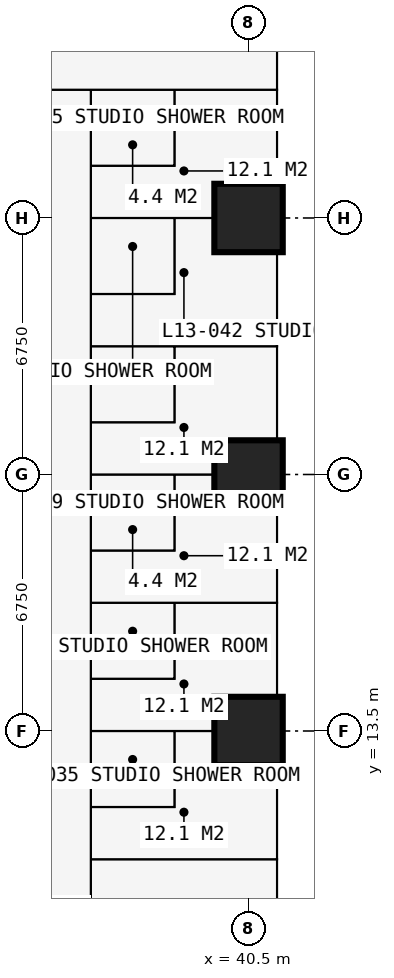
"""IFC4 building model, lengths in metres.
Left out: names, types, materials, properties, quantities, classifications, styles, units other than length and angle.
Written with IfcOpenShell. Run it as: python <this file> out.ifc"""

import sys

from ifc_helpers import new_model, si_unit, direction, frame, frame_2d, origin, origin_2d, place, context, subcontext, project, spatial, rectangle, extrude, element, fill, save


model = new_model("IFC4")
c1 = context("Model", 3, precision=1e-05, world=origin(), true_north=direction((0.0, 1.0)))
c2 = subcontext(c1, "Body", "Model", "MODEL_VIEW")
j1 = project(units=[si_unit("LENGTHUNIT", "METRE"), si_unit("PLANEANGLEUNIT", "RADIAN")], contexts=[c1])
p1 = place(None, origin())
s1 = spatial("IfcSite", under=j1, at=p1, CompositionType="ELEMENT")
p2 = place(p1, origin())
s2 = spatial("IfcBuilding", under=s1, at=p2, CompositionType="ELEMENT")
p3 = place(p2, frame((0.0, 0.0, 50.4)))
s3 = spatial("IfcBuildingStorey", under=s2, at=p3, CompositionType="ELEMENT", Elevation=50.4)
for number, where, z_axis, x_axis in (
    (1, (40.5, 13.5, 0.0), (0.0, 0.0, 1.0), (1.0, 0.0, 0.0)),
    (2, (40.5, 20.25, 0.0), (0.0, 0.0, 1.0), (1.0, 0.0, 0.0)),
    (3, (40.5, 27.0, 0.0), (0.0, 0.0, 1.0), (1.0, 0.0, 0.0)),
):
    element("IfcColumn", number, at=place(p3, frame(where, z_axis=z_axis, x_axis=x_axis)), inside=s3, PredefinedType="COLUMN", context=c2, shape_type="SweptSolid", body=[
        extrude(rectangle(XDim=1.8, YDim=1.8, at=origin_2d()), origin(), (0.0, 0.0, 1.0), 3.6),
    ])
p4 = place(p3, frame((41.25, 27.0, 0.0), z_axis=(0.0, 0.0, 1.0), x_axis=(0.0, -1.0, 0.0)))
e4 = element("IfcWall", 4, at=p4, inside=s3, PredefinedType="SOLIDWALL", context=c2, shape_type="SweptSolid", body=[
    extrude(rectangle(XDim=6.75, YDim=0.15, at=frame_2d((3.375, 0.0))), origin(), (0.0, 0.0, 1.0), 3.375),
])
p5 = place(p4, frame((0.962, 0.0, 0.0)))
e5 = element("IfcOpeningElement", 5, at=p5, cuts=e4, PredefinedType="OPENING", context=c2, shape_type="SweptSolid", body=[
    extrude(rectangle(XDim=1.0, YDim=2.2, at=frame_2d((0.5, 1.1))), frame((0.0, 0.085, 0.0), z_axis=(0.0, -1.0, 0.0), x_axis=(1.0, 0.0, 0.0)), (0.0, 0.0, 1.0), 0.17),
])
p6 = place(p4, frame((2.025, 0.0, 0.9)))
e6 = element("IfcOpeningElement", 6, at=p6, cuts=e4, PredefinedType="OPENING", context=c2, shape_type="SweptSolid", body=[
    extrude(rectangle(XDim=1.2, YDim=1.8, at=frame_2d((0.6, 0.9))), frame((0.0, 0.085, 0.0), z_axis=(0.0, -1.0, 0.0), x_axis=(1.0, 0.0, 0.0)), (0.0, 0.0, 1.0), 0.17),
])
p7 = place(p4, frame((4.788, 0.0, 0.0)))
e7 = element("IfcOpeningElement", 7, at=p7, cuts=e4, PredefinedType="OPENING", context=c2, shape_type="SweptSolid", body=[
    extrude(rectangle(XDim=1.0, YDim=2.2, at=frame_2d((0.5, 1.1))), frame((0.0, 0.085, 0.0), z_axis=(0.0, -1.0, 0.0), x_axis=(1.0, 0.0, 0.0)), (0.0, 0.0, 1.0), 0.17),
])
p8 = place(p4, frame((3.525, 0.0, 0.9)))
e8 = element("IfcOpeningElement", 8, at=p8, cuts=e4, PredefinedType="OPENING", context=c2, shape_type="SweptSolid", body=[
    extrude(rectangle(XDim=1.2, YDim=1.8, at=frame_2d((0.6, 0.9))), frame((0.0, 0.085, 0.0), z_axis=(0.0, -1.0, 0.0), x_axis=(1.0, 0.0, 0.0)), (0.0, 0.0, 1.0), 0.17),
])
p9 = place(p3, frame((41.35, 23.625, 0.0), z_axis=(0.0, 0.0, 1.0), x_axis=(1.0, 0.0, 0.0)))
e9 = element("IfcWall", 9, at=p9, inside=s3, PredefinedType="USERDEFINED", context=c2, shape_type="SweptSolid", body=[
    extrude(rectangle(XDim=2.2, YDim=1.0, at=frame_2d((1.1, 0.0))), origin(), (0.0, 0.0, 1.0), 0.9),
])
p10 = place(p3, frame((30.375, 30.375, 0.0), z_axis=(0.0, 0.0, 1.0), x_axis=(1.0, 0.0, 0.0)))
e10 = element("IfcWall", 10, at=p10, inside=s3, PredefinedType="PARTITIONING", context=c2, shape_type="SweptSolid", body=[
    extrude(rectangle(XDim=10.859, YDim=0.15, at=frame_2d((5.429, 0.0))), origin(), (0.0, 0.0, 1.0), 3.375),
])
p11 = place(p3, frame((36.35, 6.75, 0.0), z_axis=(0.0, 0.0, 1.0), x_axis=(0.0, 1.0, 0.0)))
e11 = element("IfcWall", 11, at=p11, inside=s3, PredefinedType="PARTITIONING", context=c2, shape_type="SweptSolid", body=[
    extrude(rectangle(XDim=23.625, YDim=0.1, at=frame_2d((11.812, 0.0))), origin(), (0.0, 0.0, 1.0), 3.375),
])
p12 = place(p11, frame((3.575, 0.0, 0.0)))
e12 = element("IfcOpeningElement", 12, at=p12, cuts=e11, PredefinedType="OPENING", context=c2, shape_type="SweptSolid", body=[
    extrude(rectangle(XDim=0.95, YDim=2.2, at=frame_2d((0.475, 1.1))), frame((0.0, 0.06, 0.0), z_axis=(0.0, -1.0, 0.0), x_axis=(1.0, 0.0, 0.0)), (0.0, 0.0, 1.0), 0.12),
])
p13 = place(p11, frame((7.0, 0.0, 0.0)))
e13 = element("IfcOpeningElement", 13, at=p13, cuts=e11, PredefinedType="OPENING", context=c2, shape_type="SweptSolid", body=[
    extrude(rectangle(XDim=0.95, YDim=2.2, at=frame_2d((0.475, 1.1))), frame((0.0, 0.06, 0.0), z_axis=(0.0, -1.0, 0.0), x_axis=(1.0, 0.0, 0.0)), (0.0, 0.0, 1.0), 0.12),
])
p14 = place(p11, frame((10.375, 0.0, 0.0)))
e14 = element("IfcOpeningElement", 14, at=p14, cuts=e11, PredefinedType="OPENING", context=c2, shape_type="SweptSolid", body=[
    extrude(rectangle(XDim=0.95, YDim=2.2, at=frame_2d((0.475, 1.1))), frame((0.0, 0.06, 0.0), z_axis=(0.0, -1.0, 0.0), x_axis=(1.0, 0.0, 0.0)), (0.0, 0.0, 1.0), 0.12),
])
p15 = place(p11, frame((13.75, 0.0, 0.0)))
e15 = element("IfcOpeningElement", 15, at=p15, cuts=e11, PredefinedType="OPENING", context=c2, shape_type="SweptSolid", body=[
    extrude(rectangle(XDim=0.95, YDim=2.2, at=frame_2d((0.475, 1.1))), frame((0.0, 0.06, 0.0), z_axis=(0.0, -1.0, 0.0), x_axis=(1.0, 0.0, 0.0)), (0.0, 0.0, 1.0), 0.12),
])
p16 = place(p11, frame((17.125, 0.0, 0.0)))
e16 = element("IfcOpeningElement", 16, at=p16, cuts=e11, PredefinedType="OPENING", context=c2, shape_type="SweptSolid", body=[
    extrude(rectangle(XDim=0.95, YDim=2.2, at=frame_2d((0.475, 1.1))), frame((0.0, 0.06, 0.0), z_axis=(0.0, -1.0, 0.0), x_axis=(1.0, 0.0, 0.0)), (0.0, 0.0, 1.0), 0.12),
])
p17 = place(p11, frame((20.5, 0.0, 0.0)))
e17 = element("IfcOpeningElement", 17, at=p17, cuts=e11, PredefinedType="OPENING", context=c2, shape_type="SweptSolid", body=[
    extrude(rectangle(XDim=0.95, YDim=2.2, at=frame_2d((0.475, 1.1))), frame((0.0, 0.06, 0.0), z_axis=(0.0, -1.0, 0.0), x_axis=(1.0, 0.0, 0.0)), (0.0, 0.0, 1.0), 0.12),
])
p18 = place(p3, frame((36.35, 10.125, 0.0), z_axis=(0.0, 0.0, 1.0), x_axis=(1.0, 0.0, 0.0)))
e18 = element("IfcWall", 18, at=p18, inside=s3, PredefinedType="PARTITIONING", context=c2, shape_type="SweptSolid", body=[
    extrude(rectangle(XDim=4.884, YDim=0.15, at=frame_2d((2.442, 0.0))), origin(), (0.0, 0.0, 1.0), 3.375),
])
p19 = place(p3, frame((36.35, 11.5, 0.0), z_axis=(0.0, 0.0, 1.0), x_axis=(1.0, 0.0, 0.0)))
e19 = element("IfcWall", 19, at=p19, inside=s3, PredefinedType="PARTITIONING", context=c2, shape_type="SweptSolid", body=[
    extrude(rectangle(XDim=2.2, YDim=0.1, at=frame_2d((1.1, 0.0))), origin(), (0.0, 0.0, 1.0), 3.375),
])
p20 = place(p19, frame((0.65, 0.0, 0.0)))
e20 = element("IfcOpeningElement", 20, at=p20, cuts=e19, PredefinedType="OPENING", context=c2, shape_type="SweptSolid", body=[
    extrude(rectangle(XDim=0.9, YDim=2.2, at=frame_2d((0.45, 1.1))), frame((0.0, 0.06, 0.0), z_axis=(0.0, -1.0, 0.0), x_axis=(1.0, 0.0, 0.0)), (0.0, 0.0, 1.0), 0.12),
])
p21 = place(p3, frame((36.35, 13.5, 0.0), z_axis=(0.0, 0.0, 1.0), x_axis=(1.0, 0.0, 0.0)))
e21 = element("IfcWall", 21, at=p21, inside=s3, PredefinedType="PARTITIONING", context=c2, shape_type="SweptSolid", body=[
    extrude(rectangle(XDim=4.884, YDim=0.175, at=frame_2d((2.442, 0.0))), origin(), (0.0, 0.0, 1.0), 2.61),
])
p22 = place(p3, frame((36.35, 14.875, 0.0), z_axis=(0.0, 0.0, 1.0), x_axis=(1.0, 0.0, 0.0)))
e22 = element("IfcWall", 22, at=p22, inside=s3, PredefinedType="PARTITIONING", context=c2, shape_type="SweptSolid", body=[
    extrude(rectangle(XDim=2.2, YDim=0.1, at=frame_2d((1.1, 0.0))), origin(), (0.0, 0.0, 1.0), 3.375),
])
p23 = place(p22, frame((0.65, 0.0, 0.0)))
e23 = element("IfcOpeningElement", 23, at=p23, cuts=e22, PredefinedType="OPENING", context=c2, shape_type="SweptSolid", body=[
    extrude(rectangle(XDim=0.9, YDim=2.2, at=frame_2d((0.45, 1.1))), frame((0.0, 0.06, 0.0), z_axis=(0.0, -1.0, 0.0), x_axis=(1.0, 0.0, 0.0)), (0.0, 0.0, 1.0), 0.12),
])
p24 = place(p3, frame((36.35, 16.875, 0.0), z_axis=(0.0, 0.0, 1.0), x_axis=(1.0, 0.0, 0.0)))
e24 = element("IfcWall", 24, at=p24, inside=s3, PredefinedType="PARTITIONING", context=c2, shape_type="SweptSolid", body=[
    extrude(rectangle(XDim=4.884, YDim=0.175, at=frame_2d((2.442, 0.0))), origin(), (0.0, 0.0, 1.0), 3.375),
])
p25 = place(p3, frame((36.35, 18.25, 0.0), z_axis=(0.0, 0.0, 1.0), x_axis=(1.0, 0.0, 0.0)))
e25 = element("IfcWall", 25, at=p25, inside=s3, PredefinedType="PARTITIONING", context=c2, shape_type="SweptSolid", body=[
    extrude(rectangle(XDim=2.2, YDim=0.1, at=frame_2d((1.1, 0.0))), origin(), (0.0, 0.0, 1.0), 3.375),
])
p26 = place(p25, frame((0.65, 0.0, 0.0)))
e26 = element("IfcOpeningElement", 26, at=p26, cuts=e25, PredefinedType="OPENING", context=c2, shape_type="SweptSolid", body=[
    extrude(rectangle(XDim=0.9, YDim=2.2, at=frame_2d((0.45, 1.1))), frame((0.0, 0.06, 0.0), z_axis=(0.0, -1.0, 0.0), x_axis=(1.0, 0.0, 0.0)), (0.0, 0.0, 1.0), 0.12),
])
p27 = place(p3, frame((36.35, 20.25, 0.0), z_axis=(0.0, 0.0, 1.0), x_axis=(1.0, 0.0, 0.0)))
e27 = element("IfcWall", 27, at=p27, inside=s3, PredefinedType="PARTITIONING", context=c2, shape_type="SweptSolid", body=[
    extrude(rectangle(XDim=4.884, YDim=0.175, at=frame_2d((2.442, 0.0))), origin(), (0.0, 0.0, 1.0), 2.61),
])
p28 = place(p3, frame((36.35, 21.625, 0.0), z_axis=(0.0, 0.0, 1.0), x_axis=(1.0, 0.0, 0.0)))
e28 = element("IfcWall", 28, at=p28, inside=s3, PredefinedType="PARTITIONING", context=c2, shape_type="SweptSolid", body=[
    extrude(rectangle(XDim=2.2, YDim=0.1, at=frame_2d((1.1, 0.0))), origin(), (0.0, 0.0, 1.0), 3.375),
])
p29 = place(p28, frame((0.65, 0.0, 0.0)))
e29 = element("IfcOpeningElement", 29, at=p29, cuts=e28, PredefinedType="OPENING", context=c2, shape_type="SweptSolid", body=[
    extrude(rectangle(XDim=0.9, YDim=2.2, at=frame_2d((0.45, 1.1))), frame((0.0, 0.06, 0.0), z_axis=(0.0, -1.0, 0.0), x_axis=(1.0, 0.0, 0.0)), (0.0, 0.0, 1.0), 0.12),
])
p30 = place(p3, frame((36.35, 23.625, 0.0), z_axis=(0.0, 0.0, 1.0), x_axis=(1.0, 0.0, 0.0)))
e30 = element("IfcWall", 30, at=p30, inside=s3, PredefinedType="PARTITIONING", context=c2, shape_type="SweptSolid", body=[
    extrude(rectangle(XDim=4.884, YDim=0.175, at=frame_2d((2.442, 0.0))), origin(), (0.0, 0.0, 1.0), 3.375),
])
p31 = place(p3, frame((36.35, 25.0, 0.0), z_axis=(0.0, 0.0, 1.0), x_axis=(1.0, 0.0, 0.0)))
e31 = element("IfcWall", 31, at=p31, inside=s3, PredefinedType="PARTITIONING", context=c2, shape_type="SweptSolid", body=[
    extrude(rectangle(XDim=2.2, YDim=0.1, at=frame_2d((1.1, 0.0))), origin(), (0.0, 0.0, 1.0), 3.375),
])
p32 = place(p31, frame((0.65, 0.0, 0.0)))
e32 = element("IfcOpeningElement", 32, at=p32, cuts=e31, PredefinedType="OPENING", context=c2, shape_type="SweptSolid", body=[
    extrude(rectangle(XDim=0.9, YDim=2.2, at=frame_2d((0.45, 1.1))), frame((0.0, 0.06, 0.0), z_axis=(0.0, -1.0, 0.0), x_axis=(1.0, 0.0, 0.0)), (0.0, 0.0, 1.0), 0.12),
])
p33 = place(p3, frame((36.35, 27.0, 0.0), z_axis=(0.0, 0.0, 1.0), x_axis=(1.0, 0.0, 0.0)))
e33 = element("IfcWall", 33, at=p33, inside=s3, PredefinedType="PARTITIONING", context=c2, shape_type="SweptSolid", body=[
    extrude(rectangle(XDim=4.884, YDim=0.175, at=frame_2d((2.442, 0.0))), origin(), (0.0, 0.0, 1.0), 2.877),
])
p34 = place(p3, frame((36.35, 28.375, 0.0), z_axis=(0.0, 0.0, 1.0), x_axis=(1.0, 0.0, 0.0)))
e34 = element("IfcWall", 34, at=p34, inside=s3, PredefinedType="PARTITIONING", context=c2, shape_type="SweptSolid", body=[
    extrude(rectangle(XDim=2.2, YDim=0.1, at=frame_2d((1.1, 0.0))), origin(), (0.0, 0.0, 1.0), 3.375),
])
p35 = place(p34, frame((0.65, 0.0, 0.0)))
e35 = element("IfcOpeningElement", 35, at=p35, cuts=e34, PredefinedType="OPENING", context=c2, shape_type="SweptSolid", body=[
    extrude(rectangle(XDim=0.9, YDim=2.2, at=frame_2d((0.45, 1.1))), frame((0.0, 0.06, 0.0), z_axis=(0.0, -1.0, 0.0), x_axis=(1.0, 0.0, 0.0)), (0.0, 0.0, 1.0), 0.12),
])
for number, where, z_axis, x_axis in (
    (36, (38.55, 11.5, 0.0), (0.0, 0.0, 1.0), (0.0, 1.0, 0.0)),
    (37, (38.55, 14.875, 0.0), (0.0, 0.0, 1.0), (0.0, 1.0, 0.0)),
    (38, (38.55, 18.25, 0.0), (0.0, 0.0, 1.0), (0.0, 1.0, 0.0)),
    (39, (38.55, 21.625, 0.0), (0.0, 0.0, 1.0), (0.0, 1.0, 0.0)),
    (40, (38.55, 25.0, 0.0), (0.0, 0.0, 1.0), (0.0, 1.0, 0.0)),
    (41, (38.55, 28.375, 0.0), (0.0, 0.0, 1.0), (0.0, 1.0, 0.0)),
):
    element("IfcWall", number, at=place(p3, frame(where, z_axis=z_axis, x_axis=x_axis)), inside=s3, PredefinedType="PARTITIONING", context=c2, shape_type="SweptSolid", body=[
        extrude(rectangle(XDim=2.0, YDim=0.1, at=frame_2d((1.0, 0.0))), origin(), (0.0, 0.0, 1.0), 3.375),
    ])
p36 = place(p5, origin())
e42 = element("IfcDoor", 42, at=p36, inside=s3, OperationType="SINGLE_SWING_LEFT", PredefinedType="DOOR", context=c2, shape_type="SweptSolid", body=[
    extrude(rectangle(XDim=1.0, YDim=2.2, at=frame_2d((0.5, 1.1))), frame((0.0, 0.025, 0.0), z_axis=(0.0, -1.0, 0.0), x_axis=(1.0, 0.0, 0.0)), (0.0, 0.0, 1.0), 0.05),
])
fill(e5, e42)
p37 = place(p6, origin())
e43 = element("IfcWindow", 43, at=p37, inside=s3, PartitioningType="SINGLE_PANEL", PredefinedType="WINDOW", context=c2, shape_type="SweptSolid", body=[
    extrude(rectangle(XDim=1.2, YDim=1.8, at=frame_2d((0.6, 0.9))), frame((0.0, 0.03, 0.0), z_axis=(0.0, -1.0, 0.0), x_axis=(1.0, 0.0, 0.0)), (0.0, 0.0, 1.0), 0.06),
])
fill(e6, e43)
p38 = place(p7, origin())
e44 = element("IfcDoor", 44, at=p38, inside=s3, OperationType="SINGLE_SWING_RIGHT", PredefinedType="DOOR", context=c2, shape_type="SweptSolid", body=[
    extrude(rectangle(XDim=1.0, YDim=2.2, at=frame_2d((0.5, 1.1))), frame((0.0, 0.025, 0.0), z_axis=(0.0, -1.0, 0.0), x_axis=(1.0, 0.0, 0.0)), (0.0, 0.0, 1.0), 0.05),
])
fill(e7, e44)
p39 = place(p8, origin())
e45 = element("IfcWindow", 45, at=p39, inside=s3, PartitioningType="SINGLE_PANEL", PredefinedType="WINDOW", context=c2, shape_type="SweptSolid", body=[
    extrude(rectangle(XDim=1.2, YDim=1.8, at=frame_2d((0.6, 0.9))), frame((0.0, 0.03, 0.0), z_axis=(0.0, -1.0, 0.0), x_axis=(1.0, 0.0, 0.0)), (0.0, 0.0, 1.0), 0.06),
])
fill(e8, e45)
p40 = place(p12, origin())
e46 = element("IfcDoor", 46, at=p40, inside=s3, OperationType="SINGLE_SWING_LEFT", PredefinedType="DOOR", context=c2, shape_type="SweptSolid", body=[
    extrude(rectangle(XDim=0.95, YDim=2.2, at=frame_2d((0.475, 1.1))), frame((0.0, 0.025, 0.0), z_axis=(0.0, -1.0, 0.0), x_axis=(1.0, 0.0, 0.0)), (0.0, 0.0, 1.0), 0.05),
])
fill(e12, e46)
p41 = place(p20, origin())
e47 = element("IfcDoor", 47, at=p41, inside=s3, OperationType="SINGLE_SWING_RIGHT", PredefinedType="DOOR", context=c2, shape_type="SweptSolid", body=[
    extrude(rectangle(XDim=0.9, YDim=2.2, at=frame_2d((0.45, 1.1))), frame((0.0, 0.025, 0.0), z_axis=(0.0, -1.0, 0.0), x_axis=(1.0, 0.0, 0.0)), (0.0, 0.0, 1.0), 0.05),
])
fill(e20, e47)
p42 = place(p13, origin())
e48 = element("IfcDoor", 48, at=p42, inside=s3, OperationType="SINGLE_SWING_LEFT", PredefinedType="DOOR", context=c2, shape_type="SweptSolid", body=[
    extrude(rectangle(XDim=0.95, YDim=2.2, at=frame_2d((0.475, 1.1))), frame((0.0, 0.025, 0.0), z_axis=(0.0, -1.0, 0.0), x_axis=(1.0, 0.0, 0.0)), (0.0, 0.0, 1.0), 0.05),
])
fill(e13, e48)
p43 = place(p23, origin())
e49 = element("IfcDoor", 49, at=p43, inside=s3, OperationType="SINGLE_SWING_RIGHT", PredefinedType="DOOR", context=c2, shape_type="SweptSolid", body=[
    extrude(rectangle(XDim=0.9, YDim=2.2, at=frame_2d((0.45, 1.1))), frame((0.0, 0.025, 0.0), z_axis=(0.0, -1.0, 0.0), x_axis=(1.0, 0.0, 0.0)), (0.0, 0.0, 1.0), 0.05),
])
fill(e23, e49)
p44 = place(p14, origin())
e50 = element("IfcDoor", 50, at=p44, inside=s3, OperationType="SINGLE_SWING_LEFT", PredefinedType="DOOR", context=c2, shape_type="SweptSolid", body=[
    extrude(rectangle(XDim=0.95, YDim=2.2, at=frame_2d((0.475, 1.1))), frame((0.0, 0.025, 0.0), z_axis=(0.0, -1.0, 0.0), x_axis=(1.0, 0.0, 0.0)), (0.0, 0.0, 1.0), 0.05),
])
fill(e14, e50)
p45 = place(p26, origin())
e51 = element("IfcDoor", 51, at=p45, inside=s3, OperationType="SINGLE_SWING_RIGHT", PredefinedType="DOOR", context=c2, shape_type="SweptSolid", body=[
    extrude(rectangle(XDim=0.9, YDim=2.2, at=frame_2d((0.45, 1.1))), frame((0.0, 0.025, 0.0), z_axis=(0.0, -1.0, 0.0), x_axis=(1.0, 0.0, 0.0)), (0.0, 0.0, 1.0), 0.05),
])
fill(e26, e51)
p46 = place(p15, origin())
e52 = element("IfcDoor", 52, at=p46, inside=s3, OperationType="SINGLE_SWING_LEFT", PredefinedType="DOOR", context=c2, shape_type="SweptSolid", body=[
    extrude(rectangle(XDim=0.95, YDim=2.2, at=frame_2d((0.475, 1.1))), frame((0.0, 0.025, 0.0), z_axis=(0.0, -1.0, 0.0), x_axis=(1.0, 0.0, 0.0)), (0.0, 0.0, 1.0), 0.05),
])
fill(e15, e52)
p47 = place(p29, origin())
e53 = element("IfcDoor", 53, at=p47, inside=s3, OperationType="SINGLE_SWING_RIGHT", PredefinedType="DOOR", context=c2, shape_type="SweptSolid", body=[
    extrude(rectangle(XDim=0.9, YDim=2.2, at=frame_2d((0.45, 1.1))), frame((0.0, 0.025, 0.0), z_axis=(0.0, -1.0, 0.0), x_axis=(1.0, 0.0, 0.0)), (0.0, 0.0, 1.0), 0.05),
])
fill(e29, e53)
p48 = place(p16, origin())
e54 = element("IfcDoor", 54, at=p48, inside=s3, OperationType="SINGLE_SWING_LEFT", PredefinedType="DOOR", context=c2, shape_type="SweptSolid", body=[
    extrude(rectangle(XDim=0.95, YDim=2.2, at=frame_2d((0.475, 1.1))), frame((0.0, 0.025, 0.0), z_axis=(0.0, -1.0, 0.0), x_axis=(1.0, 0.0, 0.0)), (0.0, 0.0, 1.0), 0.05),
])
fill(e16, e54)
p49 = place(p32, origin())
e55 = element("IfcDoor", 55, at=p49, inside=s3, OperationType="SINGLE_SWING_RIGHT", PredefinedType="DOOR", context=c2, shape_type="SweptSolid", body=[
    extrude(rectangle(XDim=0.9, YDim=2.2, at=frame_2d((0.45, 1.1))), frame((0.0, 0.025, 0.0), z_axis=(0.0, -1.0, 0.0), x_axis=(1.0, 0.0, 0.0)), (0.0, 0.0, 1.0), 0.05),
])
fill(e32, e55)
p50 = place(p17, origin())
e56 = element("IfcDoor", 56, at=p50, inside=s3, OperationType="SINGLE_SWING_LEFT", PredefinedType="DOOR", context=c2, shape_type="SweptSolid", body=[
    extrude(rectangle(XDim=0.95, YDim=2.2, at=frame_2d((0.475, 1.1))), frame((0.0, 0.025, 0.0), z_axis=(0.0, -1.0, 0.0), x_axis=(1.0, 0.0, 0.0)), (0.0, 0.0, 1.0), 0.05),
])
fill(e17, e56)
p51 = place(p35, origin())
e57 = element("IfcDoor", 57, at=p51, inside=s3, OperationType="SINGLE_SWING_RIGHT", PredefinedType="DOOR", context=c2, shape_type="SweptSolid", body=[
    extrude(rectangle(XDim=0.9, YDim=2.2, at=frame_2d((0.45, 1.1))), frame((0.0, 0.025, 0.0), z_axis=(0.0, -1.0, 0.0), x_axis=(1.0, 0.0, 0.0)), (0.0, 0.0, 1.0), 0.05),
])
fill(e35, e57)
save(model, sys.argv[1])
